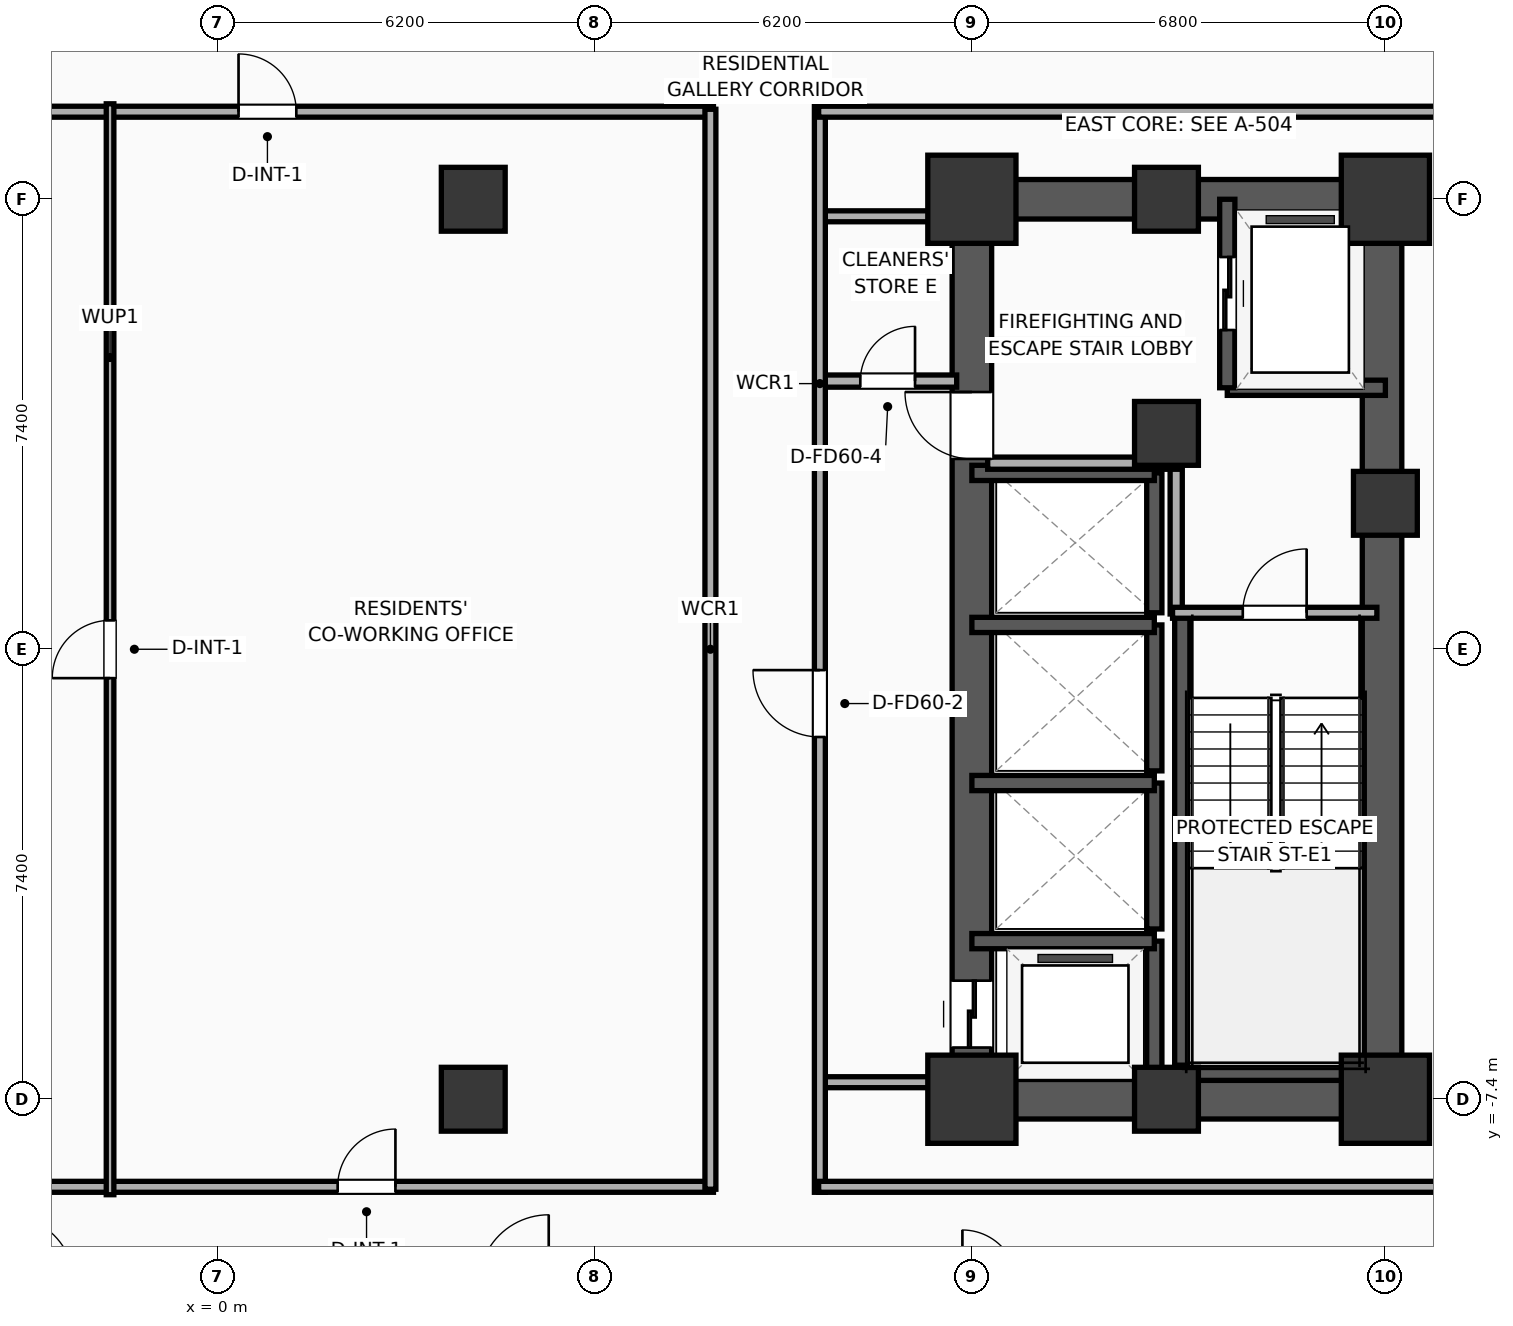
"""IFC4 building model, lengths in metres.
Left out: names, types, materials, properties, quantities, classifications, styles, units other than length and angle.
Written with IfcOpenShell. Run it as: python <this file> out.ifc"""

import sys

from ifc_helpers import new_model, si_unit, direction, frame, frame_2d, origin, origin_2d, place, context, subcontext, project, spatial, rectangle, extrude, element, fill, save


model = new_model("IFC4")
c1 = context("Model", 3, precision=1e-05, world=origin(), true_north=direction((0.0, 1.0)))
c2 = subcontext(c1, "Body", "Model", "MODEL_VIEW")
j1 = project(units=[si_unit("LENGTHUNIT", "METRE"), si_unit("PLANEANGLEUNIT", "RADIAN")], contexts=[c1])
p1 = place(None, origin())
s1 = spatial("IfcSite", under=j1, at=p1, CompositionType="ELEMENT")
p2 = place(p1, origin())
s2 = spatial("IfcBuilding", under=s1, at=p2, CompositionType="ELEMENT")
p3 = place(p2, frame((0.0, 0.0, 57.2)))
s3 = spatial("IfcBuildingStorey", under=s2, at=p3, CompositionType="ELEMENT", Elevation=57.2)
p4 = place(p3, frame((12.4, -7.4, 0.0), z_axis=(0.0, 0.0, 1.0), x_axis=(1.0, 0.0, 0.0)))
e1 = element("IfcColumn", 1, at=p4, inside=s3, PredefinedType="COLUMN", context=c2, shape_type="SweptSolid", body=[
    extrude(rectangle(XDim=1.45, YDim=1.45, at=origin_2d()), origin(), (0.0, 0.0, 1.0), 3.9),
])
p5 = place(p3, frame((15.6, 3.55, 0.0), z_axis=(0.0, 0.0, 1.0), x_axis=(1.0, 0.0, 0.0)))
e2 = element("IfcColumn", 2, at=p5, inside=s3, PredefinedType="COLUMN", context=c2, shape_type="SweptSolid", body=[
    extrude(rectangle(XDim=1.05, YDim=1.05, at=origin_2d()), origin(), (0.0, 0.0, 1.0), 3.9),
])
p6 = place(p3, frame((12.4, 7.4, 0.0), z_axis=(0.0, 0.0, 1.0), x_axis=(1.0, 0.0, 0.0)))
e3 = element("IfcColumn", 3, at=p6, inside=s3, PredefinedType="COLUMN", context=c2, shape_type="SweptSolid", body=[
    extrude(rectangle(XDim=1.45, YDim=1.45, at=origin_2d()), origin(), (0.0, 0.0, 1.0), 3.9),
])
for number, where, z_axis, x_axis in (
    (4, (15.6, -7.4, 0.0), (0.0, 0.0, 1.0), (1.0, 0.0, 0.0)),
    (5, (15.6, 7.4, 0.0), (0.0, 0.0, 1.0), (1.0, 0.0, 0.0)),
):
    element("IfcColumn", number, at=place(p3, frame(where, z_axis=z_axis, x_axis=x_axis)), inside=s3, PredefinedType="COLUMN", context=c2, shape_type="SweptSolid", body=[
        extrude(rectangle(XDim=1.05, YDim=1.05, at=origin_2d()), origin(), (0.0, 0.0, 1.0), 3.9),
    ])
p7 = place(p3, frame((19.2, -7.4, 0.0), z_axis=(0.0, 0.0, 1.0), x_axis=(1.0, 0.0, 0.0)))
e6 = element("IfcColumn", 6, at=p7, inside=s3, PredefinedType="COLUMN", context=c2, shape_type="SweptSolid", body=[
    extrude(rectangle(XDim=1.45, YDim=1.45, at=origin_2d()), origin(), (0.0, 0.0, 1.0), 3.9),
])
p8 = place(p3, frame((19.2, 2.4, 0.0), z_axis=(0.0, 0.0, 1.0), x_axis=(1.0, 0.0, 0.0)))
e7 = element("IfcColumn", 7, at=p8, inside=s3, PredefinedType="COLUMN", context=c2, shape_type="SweptSolid", body=[
    extrude(rectangle(XDim=1.05, YDim=1.05, at=origin_2d()), origin(), (0.0, 0.0, 1.0), 3.9),
])
p9 = place(p3, frame((19.2, 7.4, 0.0), z_axis=(0.0, 0.0, 1.0), x_axis=(1.0, 0.0, 0.0)))
e8 = element("IfcColumn", 8, at=p9, inside=s3, PredefinedType="COLUMN", context=c2, shape_type="SweptSolid", body=[
    extrude(rectangle(XDim=1.45, YDim=1.45, at=origin_2d()), origin(), (0.0, 0.0, 1.0), 3.9),
])
for number, where, z_axis, x_axis in (
    (9, (12.075, -7.4, 0.0), (0.0, 0.0, 1.0), (1.0, 0.0, 0.0)),
    (10, (12.075, 7.4, 0.0), (0.0, 0.0, 1.0), (1.0, 0.0, 0.0)),
):
    element("IfcWall", number, at=place(p3, frame(where, z_axis=z_axis, x_axis=x_axis)), inside=s3, PredefinedType="SHEAR", context=c2, shape_type="SweptSolid", body=[
        extrude(rectangle(XDim=7.45, YDim=0.65, at=frame_2d((3.725, 0.0))), origin(), (0.0, 0.0, 1.0), 3.65),
    ])
p10 = place(p3, frame((12.4, -7.4, 0.0), z_axis=(0.0, 0.0, 1.0), x_axis=(0.0, 1.0, 0.0)))
e11 = element("IfcWall", 11, at=p10, inside=s3, PredefinedType="SHEAR", context=c2, shape_type="SweptSolid", body=[
    extrude(rectangle(XDim=14.8, YDim=0.65, at=frame_2d((7.4, 0.0))), origin(), (0.0, 0.0, 1.0), 3.65),
])
p11 = place(p10, frame((0.85, 0.0, 0.0)))
e12 = element("IfcOpeningElement", 12, at=p11, cuts=e11, PredefinedType="OPENING", context=c2, shape_type="SweptSolid", body=[
    extrude(rectangle(XDim=1.1, YDim=2.05, at=frame_2d((0.55, 1.025))), frame((0.0, 0.335, 0.0), z_axis=(0.0, -1.0, 0.0), x_axis=(1.0, 0.0, 0.0)), (0.0, 0.0, 1.0), 0.67),
])
p12 = place(p10, frame((10.53, 0.0, 0.0)))
e13 = element("IfcOpeningElement", 13, at=p12, cuts=e11, PredefinedType="OPENING", context=c2, shape_type="SweptSolid", body=[
    extrude(rectangle(XDim=1.1, YDim=2.05, at=frame_2d((0.55, 1.025))), frame((0.0, 0.335, 0.0), z_axis=(0.0, -1.0, 0.0), x_axis=(1.0, 0.0, 0.0)), (0.0, 0.0, 1.0), 0.67),
])
p13 = place(p3, frame((19.145, -7.4, 0.0), z_axis=(0.0, 0.0, 1.0), x_axis=(0.0, 1.0, 0.0)))
e14 = element("IfcWall", 14, at=p13, inside=s3, PredefinedType="SHEAR", context=c2, shape_type="SweptSolid", body=[
    extrude(rectangle(XDim=14.8, YDim=0.65, at=frame_2d((7.4, 0.0))), origin(), (0.0, 0.0, 1.0), 3.65),
])
p14 = place(p3, frame((15.86, -7.085, 0.0), z_axis=(0.0, 0.0, 1.0), x_axis=(0.0, 1.0, 0.0)))
e15 = element("IfcWall", 15, at=p14, inside=s3, PredefinedType="SOLIDWALL", context=c2, shape_type="SweptSolid", body=[
    extrude(rectangle(XDim=7.685, YDim=0.25, at=frame_2d((3.843, 0.0))), origin(), (0.0, 0.0, 1.0), 3.65),
])
p15 = place(p3, frame((15.74, -6.965, 0.0), z_axis=(0.0, 0.0, 1.0), x_axis=(1.0, 0.0, 0.0)))
e16 = element("IfcWall", 16, at=p15, inside=s3, PredefinedType="SOLIDWALL", context=c2, shape_type="SweptSolid", body=[
    extrude(rectangle(XDim=3.46, YDim=0.25, at=frame_2d((1.73, 0.0))), origin(), (0.0, 0.0, 1.0), 3.65),
])
for number, where, z_axis, x_axis in (
    (17, (4.2, -7.4, 0.0), (0.0, 0.0, 1.0), (1.0, 0.0, 0.0)),
    (18, (4.2, 7.4, 0.0), (0.0, 0.0, 1.0), (1.0, 0.0, 0.0)),
):
    element("IfcColumn", number, at=place(p3, frame(where, z_axis=z_axis, x_axis=x_axis)), inside=s3, PredefinedType="COLUMN", context=c2, shape_type="SweptSolid", body=[
        extrude(rectangle(XDim=1.05, YDim=1.05, at=origin_2d()), origin(), (0.0, 0.0, 1.0), 3.9),
    ])
p16 = place(p3, frame((16.6, 4.3, 0.0), z_axis=(0.0, 0.0, 1.0), x_axis=(1.0, 0.0, 0.0)))
e19 = element("IfcWall", 19, at=p16, inside=s3, PredefinedType="SOLIDWALL", context=c2, shape_type="SweptSolid", body=[
    extrude(rectangle(XDim=2.6, YDim=0.25, at=frame_2d((1.3, 0.0))), origin(), (0.0, 0.0, 1.0), 3.65),
])
p17 = place(p3, frame((16.6, 7.4, 0.0), z_axis=(0.0, 0.0, 1.0), x_axis=(0.0, -1.0, 0.0)))
e20 = element("IfcWall", 20, at=p17, inside=s3, PredefinedType="SOLIDWALL", context=c2, shape_type="SweptSolid", body=[
    extrude(rectangle(XDim=3.1, YDim=0.25, at=frame_2d((1.55, 0.0))), origin(), (0.0, 0.0, 1.0), 3.65),
])
p18 = place(p17, frame((0.95, 0.0, 0.0)))
e21 = element("IfcOpeningElement", 21, at=p18, cuts=e20, PredefinedType="OPENING", context=c2, shape_type="SweptSolid", body=[
    extrude(rectangle(XDim=1.2, YDim=2.05, at=frame_2d((0.6, 1.025))), frame((0.0, 0.135, 0.0), z_axis=(0.0, -1.0, 0.0), x_axis=(1.0, 0.0, 0.0)), (0.0, 0.0, 1.0), 0.27),
])
p19 = place(p3, frame((15.4, -7.4, 0.0), z_axis=(0.0, 0.0, 1.0), x_axis=(0.0, 1.0, 0.0)))
e22 = element("IfcWall", 22, at=p19, inside=s3, PredefinedType="SOLIDWALL", context=c2, shape_type="SweptSolid", body=[
    extrude(rectangle(XDim=2.6, YDim=0.25, at=frame_2d((1.3, 0.0))), origin(), (0.0, 0.0, 1.0), 3.65),
])
p20 = place(p3, frame((15.4, -4.8, 0.0), z_axis=(0.0, 0.0, 1.0), x_axis=(-1.0, 0.0, 0.0)))
e23 = element("IfcWall", 23, at=p20, inside=s3, PredefinedType="SOLIDWALL", context=c2, shape_type="SweptSolid", body=[
    extrude(rectangle(XDim=3.0, YDim=0.25, at=frame_2d((1.5, 0.0))), origin(), (0.0, 0.0, 1.0), 3.65),
])
p21 = place(p3, frame((15.4, -4.6, 0.0), z_axis=(0.0, 0.0, 1.0), x_axis=(0.0, 1.0, 0.0)))
e24 = element("IfcWall", 24, at=p21, inside=s3, PredefinedType="SOLIDWALL", context=c2, shape_type="SweptSolid", body=[
    extrude(rectangle(XDim=2.4, YDim=0.25, at=frame_2d((1.2, 0.0))), origin(), (0.0, 0.0, 1.0), 3.65),
])
p22 = place(p3, frame((15.4, -2.2, 0.0), z_axis=(0.0, 0.0, 1.0), x_axis=(-1.0, 0.0, 0.0)))
e25 = element("IfcWall", 25, at=p22, inside=s3, PredefinedType="SOLIDWALL", context=c2, shape_type="SweptSolid", body=[
    extrude(rectangle(XDim=3.0, YDim=0.25, at=frame_2d((1.5, 0.0))), origin(), (0.0, 0.0, 1.0), 3.65),
])
p23 = place(p3, frame((15.4, -2.0, 0.0), z_axis=(0.0, 0.0, 1.0), x_axis=(0.0, 1.0, 0.0)))
e26 = element("IfcWall", 26, at=p23, inside=s3, PredefinedType="SOLIDWALL", context=c2, shape_type="SweptSolid", body=[
    extrude(rectangle(XDim=2.4, YDim=0.25, at=frame_2d((1.2, 0.0))), origin(), (0.0, 0.0, 1.0), 3.65),
])
p24 = place(p3, frame((15.4, 0.4, 0.0), z_axis=(0.0, 0.0, 1.0), x_axis=(-1.0, 0.0, 0.0)))
e27 = element("IfcWall", 27, at=p24, inside=s3, PredefinedType="SOLIDWALL", context=c2, shape_type="SweptSolid", body=[
    extrude(rectangle(XDim=3.0, YDim=0.25, at=frame_2d((1.5, 0.0))), origin(), (0.0, 0.0, 1.0), 3.65),
])
p25 = place(p3, frame((15.4, 0.6, 0.0), z_axis=(0.0, 0.0, 1.0), x_axis=(0.0, 1.0, 0.0)))
e28 = element("IfcWall", 28, at=p25, inside=s3, PredefinedType="SOLIDWALL", context=c2, shape_type="SweptSolid", body=[
    extrude(rectangle(XDim=2.3, YDim=0.25, at=frame_2d((1.15, 0.0))), origin(), (0.0, 0.0, 1.0), 3.65),
])
p26 = place(p3, frame((15.4, 2.9, 0.0), z_axis=(0.0, 0.0, 1.0), x_axis=(-1.0, 0.0, 0.0)))
e29 = element("IfcWall", 29, at=p26, inside=s3, PredefinedType="SOLIDWALL", context=c2, shape_type="SweptSolid", body=[
    extrude(rectangle(XDim=3.0, YDim=0.25, at=frame_2d((1.5, 0.0))), origin(), (0.0, 0.0, 1.0), 3.65),
])
p27 = place(p3, frame((15.76, 0.58, 0.0), z_axis=(0.0, 0.0, 1.0), x_axis=(0.0, 1.0, 0.0)))
e30 = element("IfcWall", 30, at=p27, inside=s3, PredefinedType="PARTITIONING", context=c2, shape_type="SweptSolid", body=[
    extrude(rectangle(XDim=2.52, YDim=0.2, at=frame_2d((1.26, 0.0))), origin(), (0.0, 0.0, 1.0), 3.65),
])
p28 = place(p3, frame((12.66, 3.06, 0.0), z_axis=(0.0, 0.0, 1.0), x_axis=(1.0, 0.0, 0.0)))
e31 = element("IfcWall", 31, at=p28, inside=s3, PredefinedType="PARTITIONING", context=c2, shape_type="SweptSolid", body=[
    extrude(rectangle(XDim=3.16, YDim=0.2, at=frame_2d((1.58, 0.0))), origin(), (0.0, 0.0, 1.0), 3.65),
])
p29 = place(p3, frame((15.7, 0.6, 0.0), z_axis=(0.0, 0.0, 1.0), x_axis=(1.0, 0.0, 0.0)))
e32 = element("IfcWall", 32, at=p29, inside=s3, PredefinedType="PARTITIONING", context=c2, shape_type="SweptSolid", body=[
    extrude(rectangle(XDim=3.36, YDim=0.18, at=frame_2d((1.68, 0.0))), origin(), (0.0, 0.0, 1.0), 3.65),
])
p30 = place(p29, frame((1.155, 0.0, 0.0)))
e33 = element("IfcOpeningElement", 33, at=p30, cuts=e32, PredefinedType="OPENING", context=c2, shape_type="SweptSolid", body=[
    extrude(rectangle(XDim=1.05, YDim=2.05, at=frame_2d((0.525, 1.025))), frame((0.0, 0.1, 0.0), z_axis=(0.0, -1.0, 0.0), x_axis=(1.0, 0.0, 0.0)), (0.0, 0.0, 1.0), 0.2),
])
p31 = place(p3, frame((9.88, 4.41, 0.0), z_axis=(0.0, 0.0, 1.0), x_axis=(1.0, 0.0, 0.0)))
e34 = element("IfcWall", 34, at=p31, inside=s3, PredefinedType="PARTITIONING", context=c2, shape_type="SweptSolid", body=[
    extrude(rectangle(XDim=2.27, YDim=0.2, at=frame_2d((1.135, 0.0))), origin(), (0.0, 0.0, 1.0), 3.65),
])
p32 = place(p31, frame((0.685, 0.0, 0.0)))
e35 = element("IfcOpeningElement", 35, at=p32, cuts=e34, PredefinedType="OPENING", context=c2, shape_type="SweptSolid", body=[
    extrude(rectangle(XDim=0.9, YDim=2.05, at=frame_2d((0.45, 1.025))), frame((0.0, 0.11, 0.0), z_axis=(0.0, -1.0, 0.0), x_axis=(1.0, 0.0, 0.0)), (0.0, 0.0, 1.0), 0.22),
])
for number, where, z_axis, x_axis in (
    (36, (9.88, 7.12, 0.0), (0.0, 0.0, 1.0), (1.0, 0.0, 0.0)),
    (37, (9.88, -7.12, 0.0), (0.0, 0.0, 1.0), (1.0, 0.0, 0.0)),
):
    element("IfcWall", number, at=place(p3, frame(where, z_axis=z_axis, x_axis=x_axis)), inside=s3, PredefinedType="PARTITIONING", context=c2, shape_type="SweptSolid", body=[
        extrude(rectangle(XDim=2.27, YDim=0.18, at=frame_2d((1.135, 0.0))), origin(), (0.0, 0.0, 1.0), 2.94),
    ])
p33 = place(p3, frame((9.9, -8.93, 0.0), z_axis=(0.0, 0.0, 1.0), x_axis=(0.0, 1.0, 0.0)))
e38 = element("IfcWall", 38, at=p33, inside=s3, PredefinedType="PARTITIONING", context=c2, shape_type="SweptSolid", body=[
    extrude(rectangle(XDim=17.86, YDim=0.18, at=frame_2d((8.93, 0.0))), origin(), (0.0, 0.0, 1.0), 3.65),
])
p34 = place(p33, frame((7.487, 0.0, 0.0)))
e39 = element("IfcOpeningElement", 39, at=p34, cuts=e38, PredefinedType="OPENING", context=c2, shape_type="SweptSolid", body=[
    extrude(rectangle(XDim=1.1, YDim=2.05, at=frame_2d((0.55, 1.025))), frame((0.0, 0.1, 0.0), z_axis=(0.0, -1.0, 0.0), x_axis=(1.0, 0.0, 0.0)), (0.0, 0.0, 1.0), 0.2),
])
p35 = place(p3, frame((9.88, 8.84, 0.0), z_axis=(0.0, 0.0, 1.0), x_axis=(1.0, 0.0, 0.0)))
e40 = element("IfcWall", 40, at=p35, inside=s3, PredefinedType="PARTITIONING", context=c2, shape_type="SweptSolid", body=[
    extrude(rectangle(XDim=16.33, YDim=0.18, at=frame_2d((8.165, 0.0))), origin(), (0.0, 0.0, 1.0), 3.65),
])
p36 = place(p35, frame((13.99, 0.0, 0.0)))
e41 = element("IfcOpeningElement", 41, at=p36, cuts=e40, PredefinedType="OPENING", context=c2, shape_type="SweptSolid", body=[
    extrude(rectangle(XDim=0.9, YDim=2.05, at=frame_2d((0.45, 1.025))), frame((0.0, 0.1, 0.0), z_axis=(0.0, -1.0, 0.0), x_axis=(1.0, 0.0, 0.0)), (0.0, 0.0, 1.0), 0.2),
])
p37 = place(p3, frame((9.88, -8.84, 0.0), z_axis=(0.0, 0.0, 1.0), x_axis=(1.0, 0.0, 0.0)))
e42 = element("IfcWall", 42, at=p37, inside=s3, PredefinedType="PARTITIONING", context=c2, shape_type="SweptSolid", body=[
    extrude(rectangle(XDim=16.33, YDim=0.18, at=frame_2d((8.165, 0.0))), origin(), (0.0, 0.0, 1.0), 3.65),
])
p38 = place(p3, frame((-8.15, 8.84, 0.0), z_axis=(0.0, 0.0, 1.0), x_axis=(1.0, 0.0, 0.0)))
e43 = element("IfcWall", 43, at=p38, inside=s3, PredefinedType="PARTITIONING", context=c2, shape_type="SweptSolid", body=[
    extrude(rectangle(XDim=16.3, YDim=0.18, at=frame_2d((8.15, 0.0))), origin(), (0.0, 0.0, 1.0), 3.65),
])
p39 = place(p38, frame((8.49, 0.0, 0.0)))
e44 = element("IfcOpeningElement", 44, at=p39, cuts=e43, PredefinedType="OPENING", context=c2, shape_type="SweptSolid", body=[
    extrude(rectangle(XDim=0.95, YDim=2.05, at=frame_2d((0.475, 1.025))), frame((0.0, 0.1, 0.0), z_axis=(0.0, -1.0, 0.0), x_axis=(1.0, 0.0, 0.0)), (0.0, 0.0, 1.0), 0.2),
])
p40 = place(p3, frame((-8.15, -8.84, 0.0), z_axis=(0.0, 0.0, 1.0), x_axis=(1.0, 0.0, 0.0)))
e45 = element("IfcWall", 45, at=p40, inside=s3, PredefinedType="PARTITIONING", context=c2, shape_type="SweptSolid", body=[
    extrude(rectangle(XDim=16.3, YDim=0.18, at=frame_2d((8.15, 0.0))), origin(), (0.0, 0.0, 1.0), 3.65),
])
p41 = place(p40, frame((1.13, 0.0, 0.0)))
e46 = element("IfcOpeningElement", 46, at=p41, cuts=e45, PredefinedType="OPENING", context=c2, shape_type="SweptSolid", body=[
    extrude(rectangle(XDim=1.0, YDim=2.05, at=frame_2d((0.5, 1.025))), frame((0.0, 0.1, 0.0), z_axis=(0.0, -1.0, 0.0), x_axis=(1.0, 0.0, 0.0)), (0.0, 0.0, 1.0), 0.2),
])
p42 = place(p40, frame((10.12, 0.0, 0.0)))
e47 = element("IfcOpeningElement", 47, at=p42, cuts=e45, PredefinedType="OPENING", context=c2, shape_type="SweptSolid", body=[
    extrude(rectangle(XDim=0.95, YDim=2.05, at=frame_2d((0.475, 1.025))), frame((0.0, 0.1, 0.0), z_axis=(0.0, -1.0, 0.0), x_axis=(1.0, 0.0, 0.0)), (0.0, 0.0, 1.0), 0.2),
])
p43 = place(p3, frame((8.1, -8.88, 0.0), z_axis=(0.0, 0.0, 1.0), x_axis=(0.0, 1.0, 0.0)))
e48 = element("IfcWall", 48, at=p43, inside=s3, PredefinedType="PARTITIONING", context=c2, shape_type="SweptSolid", body=[
    extrude(rectangle(XDim=17.76, YDim=0.18, at=frame_2d((8.88, 0.0))), origin(), (0.0, 0.0, 1.0), 3.65),
])
p44 = place(p3, frame((-1.773, -8.97, 0.0), z_axis=(0.0, 0.0, 1.0), x_axis=(0.0, 1.0, 0.0)))
e49 = element("IfcWall", 49, at=p44, inside=s3, PredefinedType="PARTITIONING", context=c2, shape_type="SweptSolid", body=[
    extrude(rectangle(XDim=17.94, YDim=0.125, at=frame_2d((8.97, 0.0))), origin(), (0.0, 0.0, 1.0), 3.65),
])
p45 = place(p44, frame((8.495, 0.0, 0.0)))
e50 = element("IfcOpeningElement", 50, at=p45, cuts=e49, PredefinedType="OPENING", context=c2, shape_type="SweptSolid", body=[
    extrude(rectangle(XDim=0.95, YDim=2.05, at=frame_2d((0.475, 1.025))), frame((0.0, 0.073, 0.0), z_axis=(0.0, -1.0, 0.0), x_axis=(1.0, 0.0, 0.0)), (0.0, 0.0, 1.0), 0.145),
])
p46 = place(p18, origin())
e51 = element("IfcDoor", 51, at=p46, inside=s3, OperationType="SLIDING_TO_LEFT", PredefinedType="DOOR", context=c2, shape_type="SweptSolid", body=[
    extrude(rectangle(XDim=1.2, YDim=2.05, at=frame_2d((0.6, 1.025))), frame((0.0, 0.025, 0.0), z_axis=(0.0, -1.0, 0.0), x_axis=(1.0, 0.0, 0.0)), (0.0, 0.0, 1.0), 0.05),
])
fill(e21, e51)
p47 = place(p11, origin())
e52 = element("IfcDoor", 52, at=p47, inside=s3, OperationType="SLIDING_TO_LEFT", PredefinedType="DOOR", context=c2, shape_type="SweptSolid", body=[
    extrude(rectangle(XDim=1.1, YDim=2.05, at=frame_2d((0.55, 1.025))), frame((0.0, 0.025, 0.0), z_axis=(0.0, -1.0, 0.0), x_axis=(1.0, 0.0, 0.0)), (0.0, 0.0, 1.0), 0.05),
])
fill(e12, e52)
p48 = place(p30, origin())
e53 = element("IfcDoor", 53, at=p48, inside=s3, OperationType="SINGLE_SWING_RIGHT", PredefinedType="DOOR", context=c2, shape_type="SweptSolid", body=[
    extrude(rectangle(XDim=1.05, YDim=2.05, at=frame_2d((0.525, 1.025))), frame((0.0, 0.025, 0.0), z_axis=(0.0, -1.0, 0.0), x_axis=(1.0, 0.0, 0.0)), (0.0, 0.0, 1.0), 0.05),
])
fill(e33, e53)
p49 = place(p32, origin())
e54 = element("IfcDoor", 54, at=p49, inside=s3, OperationType="SINGLE_SWING_RIGHT", PredefinedType="DOOR", context=c2, shape_type="SweptSolid", body=[
    extrude(rectangle(XDim=0.9, YDim=2.05, at=frame_2d((0.45, 1.025))), frame((0.0, 0.025, 0.0), z_axis=(0.0, -1.0, 0.0), x_axis=(1.0, 0.0, 0.0)), (0.0, 0.0, 1.0), 0.05),
])
fill(e35, e54)
p50 = place(p34, origin())
e55 = element("IfcDoor", 55, at=p50, inside=s3, OperationType="SINGLE_SWING_RIGHT", PredefinedType="DOOR", context=c2, shape_type="SweptSolid", body=[
    extrude(rectangle(XDim=1.1, YDim=2.05, at=frame_2d((0.55, 1.025))), frame((0.0, 0.025, 0.0), z_axis=(0.0, -1.0, 0.0), x_axis=(1.0, 0.0, 0.0)), (0.0, 0.0, 1.0), 0.05),
])
fill(e39, e55)
p51 = place(p39, origin())
e56 = element("IfcDoor", 56, at=p51, inside=s3, OperationType="SINGLE_SWING_LEFT", PredefinedType="DOOR", context=c2, shape_type="SweptSolid", body=[
    extrude(rectangle(XDim=0.95, YDim=2.05, at=frame_2d((0.475, 1.025))), frame((0.0, 0.025, 0.0), z_axis=(0.0, -1.0, 0.0), x_axis=(1.0, 0.0, 0.0)), (0.0, 0.0, 1.0), 0.05),
])
fill(e44, e56)
p52 = place(p42, origin())
e57 = element("IfcDoor", 57, at=p52, inside=s3, OperationType="SINGLE_SWING_RIGHT", PredefinedType="DOOR", context=c2, shape_type="SweptSolid", body=[
    extrude(rectangle(XDim=0.95, YDim=2.05, at=frame_2d((0.475, 1.025))), frame((0.0, 0.025, 0.0), z_axis=(0.0, -1.0, 0.0), x_axis=(1.0, 0.0, 0.0)), (0.0, 0.0, 1.0), 0.05),
])
fill(e47, e57)
p53 = place(p45, origin())
e58 = element("IfcDoor", 58, at=p53, inside=s3, OperationType="SINGLE_SWING_LEFT", PredefinedType="DOOR", context=c2, shape_type="SweptSolid", body=[
    extrude(rectangle(XDim=0.95, YDim=2.05, at=frame_2d((0.475, 1.025))), frame((0.0, 0.025, 0.0), z_axis=(0.0, -1.0, 0.0), x_axis=(1.0, 0.0, 0.0)), (0.0, 0.0, 1.0), 0.05),
])
fill(e50, e58)
p54 = place(p12, origin())
e59 = element("IfcDoor", 59, at=p54, inside=s3, OperationType="SINGLE_SWING_RIGHT", PredefinedType="DOOR", context=c2, shape_type="SweptSolid", body=[
    extrude(rectangle(XDim=1.1, YDim=2.05, at=frame_2d((0.55, 1.025))), frame((0.0, 0.025, 0.0), z_axis=(0.0, -1.0, 0.0), x_axis=(1.0, 0.0, 0.0)), (0.0, 0.0, 1.0), 0.05),
])
fill(e13, e59)
save(model, sys.argv[1])
